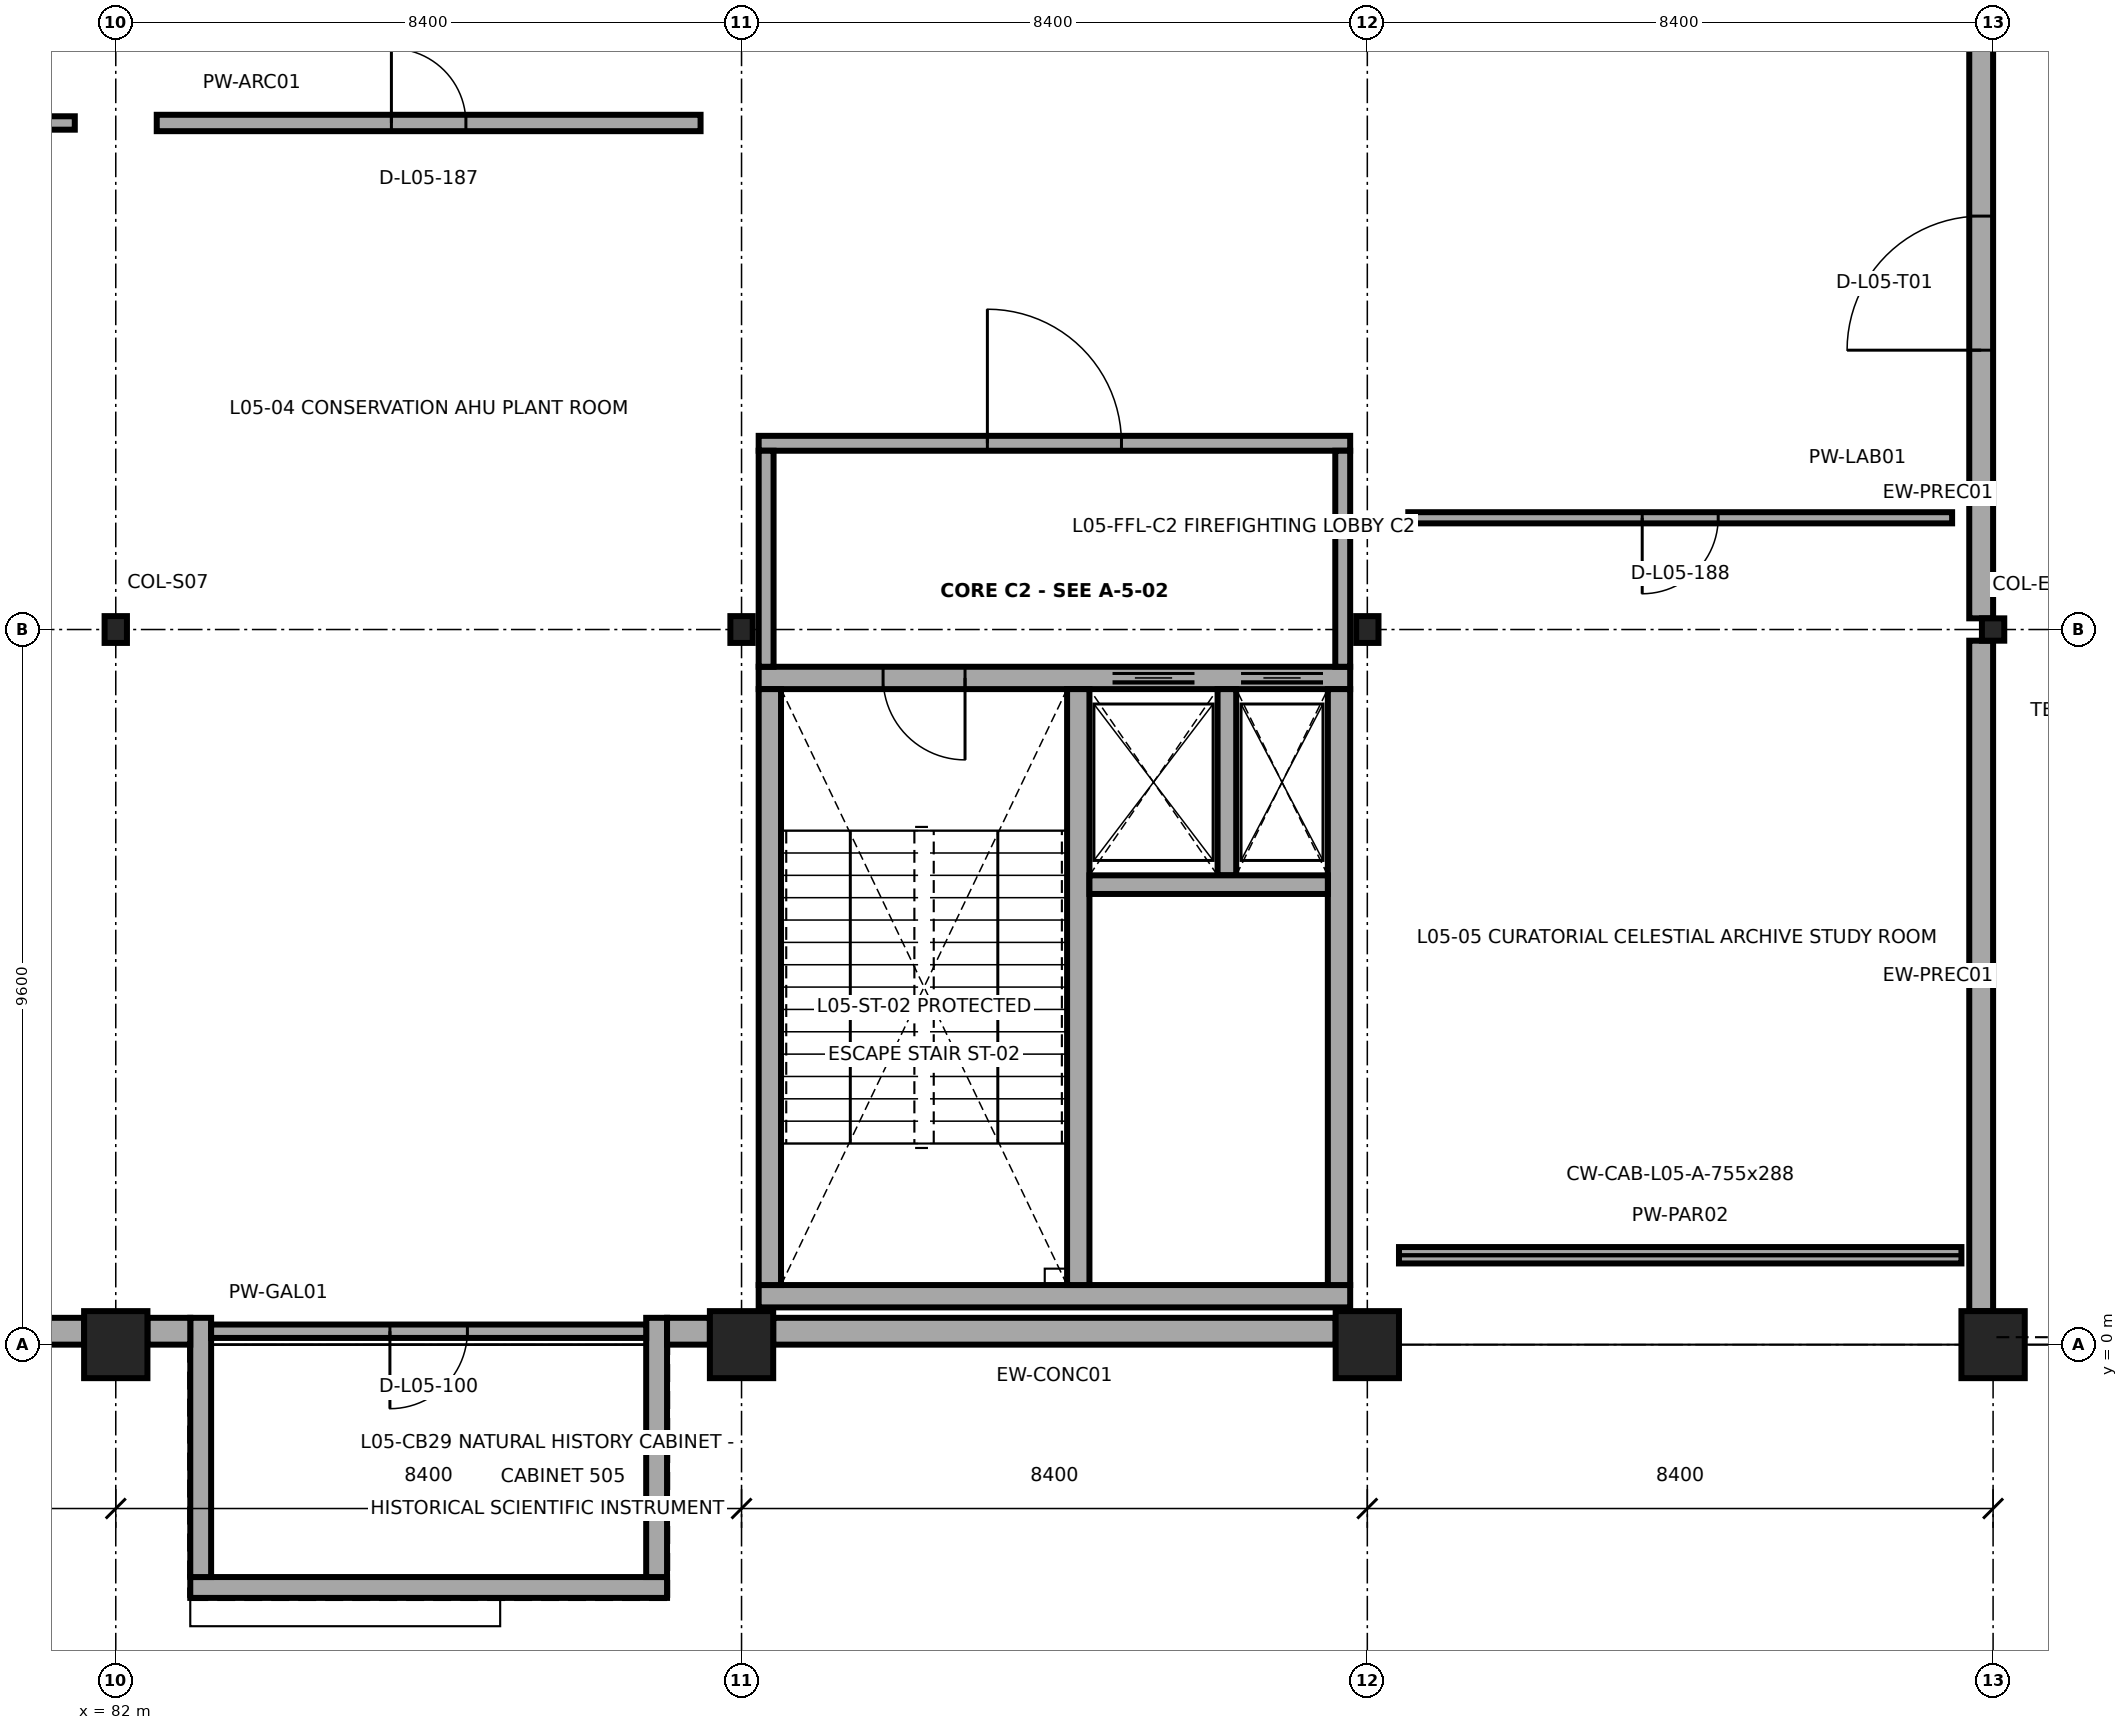
"""IFC4 building model, lengths in metres.
Left out: names, types, materials, properties, quantities, classifications, styles, units other than length and angle.
Written with IfcOpenShell. Run it as: python <this file> out.ifc"""

import sys

from ifc_helpers import new_model, si_unit, direction, frame, frame_2d, origin, origin_2d, place, context, subcontext, project, spatial, rectangle, i_section, extrude, element, fill, save


model = new_model("IFC4")
c1 = context("Model", 3, precision=1e-05, world=origin(), true_north=direction((0.0, 1.0)))
c2 = subcontext(c1, "Body", "Model", "MODEL_VIEW")
j1 = project(units=[si_unit("LENGTHUNIT", "METRE"), si_unit("PLANEANGLEUNIT", "RADIAN")], contexts=[c1])
p1 = place(None, origin())
s1 = spatial("IfcSite", under=j1, at=p1, CompositionType="ELEMENT")
p2 = place(p1, origin())
s2 = spatial("IfcBuilding", under=s1, at=p2, CompositionType="ELEMENT")
p3 = place(p2, frame((0.0, 0.0, 26.4)))
s3 = spatial("IfcBuildingStorey", under=s2, at=p3, CompositionType="ELEMENT", Elevation=26.4)
p4 = place(p3, frame((82.0, 0.0, 0.0), z_axis=(0.0, 0.0, 1.0), x_axis=(1.0, 0.0, 0.0)))
e1 = element("IfcColumn", 1, at=p4, inside=s3, PredefinedType="COLUMN", context=c2, shape_type="SweptSolid", body=[
    extrude(rectangle(XDim=0.85, YDim=0.9, at=origin_2d()), origin(), (0.0, 0.0, 1.0), 4.8),
])
p5 = place(p3, frame((82.0, 9.6, 0.0), z_axis=(0.0, 0.0, 1.0), x_axis=(1.0, 0.0, 0.0)))
e2 = element("IfcColumn", 2, at=p5, inside=s3, PredefinedType="COLUMN", context=c2, shape_type="SweptSolid", body=[
    extrude(i_section(OverallWidth=0.3, OverallDepth=0.36, WebThickness=0.012, FlangeThickness=0.022, FilletRadius=0.027, at=origin_2d()), origin(), (0.0, 0.0, 1.0), 4.8),
])
p6 = place(p3, frame((90.4, 0.0, 0.0), z_axis=(0.0, 0.0, 1.0), x_axis=(1.0, 0.0, 0.0)))
e3 = element("IfcColumn", 3, at=p6, inside=s3, PredefinedType="COLUMN", context=c2, shape_type="SweptSolid", body=[
    extrude(rectangle(XDim=0.85, YDim=0.9, at=origin_2d()), origin(), (0.0, 0.0, 1.0), 4.8),
])
p7 = place(p3, frame((90.4, 9.6, 0.0), z_axis=(0.0, 0.0, 1.0), x_axis=(1.0, 0.0, 0.0)))
e4 = element("IfcColumn", 4, at=p7, inside=s3, PredefinedType="COLUMN", context=c2, shape_type="SweptSolid", body=[
    extrude(i_section(OverallWidth=0.3, OverallDepth=0.36, WebThickness=0.012, FlangeThickness=0.022, FilletRadius=0.027, at=origin_2d()), origin(), (0.0, 0.0, 1.0), 4.8),
])
p8 = place(p3, frame((98.8, 0.0, 0.0), z_axis=(0.0, 0.0, 1.0), x_axis=(1.0, 0.0, 0.0)))
e5 = element("IfcColumn", 5, at=p8, inside=s3, PredefinedType="COLUMN", context=c2, shape_type="SweptSolid", body=[
    extrude(rectangle(XDim=0.85, YDim=0.9, at=origin_2d()), origin(), (0.0, 0.0, 1.0), 4.8),
])
p9 = place(p3, frame((98.8, 9.6, 0.0), z_axis=(0.0, 0.0, 1.0), x_axis=(1.0, 0.0, 0.0)))
e6 = element("IfcColumn", 6, at=p9, inside=s3, PredefinedType="COLUMN", context=c2, shape_type="SweptSolid", body=[
    extrude(i_section(OverallWidth=0.3, OverallDepth=0.36, WebThickness=0.012, FlangeThickness=0.022, FilletRadius=0.027, at=origin_2d()), origin(), (0.0, 0.0, 1.0), 4.8),
])
p10 = place(p3, frame((107.2, 0.0, 0.0), z_axis=(0.0, 0.0, 1.0), x_axis=(1.0, 0.0, 0.0)))
e7 = element("IfcColumn", 7, at=p10, inside=s3, PredefinedType="COLUMN", context=c2, shape_type="SweptSolid", body=[
    extrude(rectangle(XDim=0.85, YDim=0.9, at=origin_2d()), origin(), (0.0, 0.0, 1.0), 4.8),
])
p11 = place(p3, frame((107.2, 9.6, 0.0), z_axis=(0.0, 0.0, 1.0), x_axis=(0.0, 1.0, 0.0)))
e8 = element("IfcColumn", 8, at=p11, inside=s3, PredefinedType="COLUMN", context=c2, shape_type="SweptSolid", body=[
    extrude(i_section(OverallWidth=0.3, OverallDepth=0.3, WebThickness=0.011, FlangeThickness=0.019, FilletRadius=0.027, at=origin_2d()), origin(), (0.0, 0.0, 1.0), 4.8),
])
p12 = place(p3, frame((83.0, -3.26, 0.0), z_axis=(0.0, 0.0, 1.0), x_axis=(1.0, 0.0, 0.0)))
e9 = element("IfcWall", 9, at=p12, inside=s3, PredefinedType="SOLIDWALL", context=c2, shape_type="SweptSolid", body=[
    extrude(rectangle(XDim=6.4, YDim=0.28, at=frame_2d((3.2, 0.0))), origin(), (0.0, 0.0, 1.0), 2.99),
])
for number, where, z_axis, x_axis in (
    (10, (83.14, 0.36, 0.0), (0.0, 0.0, 1.0), (0.0, -1.0, 0.0)),
    (11, (89.26, -3.12, 0.0), (0.0, 0.0, 1.0), (0.0, 1.0, 0.0)),
):
    element("IfcWall", number, at=place(p3, frame(where, z_axis=z_axis, x_axis=x_axis)), inside=s3, PredefinedType="SOLIDWALL", context=c2, shape_type="SweptSolid", body=[
        extrude(rectangle(XDim=3.48, YDim=0.28, at=frame_2d((1.74, 0.0))), origin(), (0.0, 0.0, 1.0), 2.99),
    ])
for number, where, z_axis, x_axis in (
    (12, (81.0, 0.18, 0.0), (0.0, 0.0, 1.0), (1.0, 0.0, 0.0)),
    (13, (82.425, 0.18, 0.0), (0.0, 0.0, 1.0), (1.0, 0.0, 0.0)),
):
    element("IfcWall", number, at=place(p3, frame(where, z_axis=z_axis, x_axis=x_axis)), inside=s3, PredefinedType="SOLIDWALL", context=c2, shape_type="SweptSolid", body=[
        extrude(rectangle(XDim=0.575, YDim=0.36, at=frame_2d((0.288, 0.0))), origin(), (0.0, 0.0, 1.0), 3.625),
    ])
p13 = place(p3, frame((89.4, 0.18, 0.0), z_axis=(0.0, 0.0, 1.0), x_axis=(1.0, 0.0, 0.0)))
e14 = element("IfcWall", 14, at=p13, inside=s3, PredefinedType="SOLIDWALL", context=c2, shape_type="SweptSolid", body=[
    extrude(rectangle(XDim=0.575, YDim=0.36, at=frame_2d((0.288, 0.0))), origin(), (0.0, 0.0, 1.0), 3.625),
])
p14 = place(p3, frame((90.825, 0.18, 0.0), z_axis=(0.0, 0.0, 1.0), x_axis=(1.0, 0.0, 0.0)))
e15 = element("IfcWall", 15, at=p14, inside=s3, PredefinedType="SOLIDWALL", context=c2, shape_type="SweptSolid", body=[
    extrude(rectangle(XDim=7.55, YDim=0.36, at=frame_2d((3.775, 0.0))), origin(), (0.0, 0.0, 1.0), 3.625),
])
p15 = place(p3, frame((99.225, 1.2, -0.002), z_axis=(0.0, 0.0, 1.0), x_axis=(1.0, 0.0, 0.0)))
e16 = element("IfcWall", 16, at=p15, inside=s3, PredefinedType="PARAPET", context=c2, shape_type="SweptSolid", body=[
    extrude(rectangle(XDim=7.55, YDim=0.22, at=frame_2d((3.775, 0.0))), origin(), (0.0, 0.0, 1.0), 0.746),
])
p16 = place(p3, frame((107.04, 9.75, 0.0), z_axis=(0.0, 0.0, 1.0), x_axis=(0.0, 1.0, 0.0)))
e17 = element("IfcWall", 17, at=p16, inside=s3, PredefinedType="SOLIDWALL", context=c2, shape_type="SweptSolid", body=[
    extrude(rectangle(XDim=9.0, YDim=0.32, at=frame_2d((4.5, 0.0))), origin(), (0.0, 0.0, 1.0), 3.622),
])
p17 = place(p16, frame((3.6, 0.0, 0.0)))
e18 = element("IfcOpeningElement", 18, at=p17, cuts=e17, PredefinedType="OPENING", context=c2, shape_type="SweptSolid", body=[
    extrude(rectangle(XDim=1.8, YDim=2.3, at=frame_2d((0.9, 1.15))), frame((0.0, 0.17, 0.0), z_axis=(0.0, -1.0, 0.0), x_axis=(1.0, 0.0, 0.0)), (0.0, 0.0, 1.0), 0.34),
])
p18 = place(p3, frame((107.04, 0.45, 0.0), z_axis=(0.0, 0.0, 1.0), x_axis=(0.0, 1.0, 0.0)))
e19 = element("IfcWall", 19, at=p18, inside=s3, PredefinedType="SOLIDWALL", context=c2, shape_type="SweptSolid", body=[
    extrude(rectangle(XDim=9.0, YDim=0.32, at=frame_2d((4.5, 0.0))), origin(), (0.0, 0.0, 1.0), 3.622),
])
p19 = place(p3, frame((90.63, 0.65, 0.0), z_axis=(0.0, 0.0, 1.0), x_axis=(1.0, 0.0, 0.0)))
e20 = element("IfcWall", 20, at=p19, inside=s3, PredefinedType="SHEAR", context=c2, shape_type="SweptSolid", body=[
    extrude(rectangle(XDim=7.94, YDim=0.3, at=frame_2d((3.97, 0.0))), origin(), (0.0, 0.0, 1.0), 4.54),
])
p20 = place(p3, frame((98.57, 8.95, 0.0), z_axis=(0.0, 0.0, 1.0), x_axis=(-1.0, 0.0, 0.0)))
e21 = element("IfcWall", 21, at=p20, inside=s3, PredefinedType="SHEAR", context=c2, shape_type="SweptSolid", body=[
    extrude(rectangle(XDim=7.94, YDim=0.3, at=frame_2d((3.97, 0.0))), origin(), (0.0, 0.0, 1.0), 4.54),
])
p21 = place(p20, frame((5.17, 0.0, 0.0)))
e22 = element("IfcOpeningElement", 22, at=p21, cuts=e21, PredefinedType="OPENING", context=c2, shape_type="SweptSolid", body=[
    extrude(rectangle(XDim=1.1, YDim=2.2, at=frame_2d((0.55, 1.1))), frame((0.0, 0.16, 0.0), z_axis=(0.0, -1.0, 0.0), x_axis=(1.0, 0.0, 0.0)), (0.0, 0.0, 1.0), 0.32),
])
p22 = place(p20, frame((2.09, 0.0, 0.0)))
e23 = element("IfcOpeningElement", 23, at=p22, cuts=e21, PredefinedType="OPENING", context=c2, shape_type="SweptSolid", body=[
    extrude(rectangle(XDim=1.1, YDim=2.1, at=frame_2d((0.55, 1.05))), frame((0.0, 0.16, 0.0), z_axis=(0.0, -1.0, 0.0), x_axis=(1.0, 0.0, 0.0)), (0.0, 0.0, 1.0), 0.32),
])
p23 = place(p20, frame((0.365, 0.0, 0.0)))
e24 = element("IfcOpeningElement", 24, at=p23, cuts=e21, PredefinedType="OPENING", context=c2, shape_type="SweptSolid", body=[
    extrude(rectangle(XDim=1.1, YDim=2.1, at=frame_2d((0.55, 1.05))), frame((0.0, 0.16, 0.0), z_axis=(0.0, -1.0, 0.0), x_axis=(1.0, 0.0, 0.0)), (0.0, 0.0, 1.0), 0.32),
])
for number, where, z_axis, x_axis in (
    (25, (90.78, 8.8, 0.0), (0.0, 0.0, 1.0), (0.0, -1.0, 0.0)),
    (26, (98.42, 0.8, 0.0), (0.0, 0.0, 1.0), (0.0, 1.0, 0.0)),
    (27, (94.92, 0.8, 0.0), (0.0, 0.0, 1.0), (0.0, 1.0, 0.0)),
):
    element("IfcWall", number, at=place(p3, frame(where, z_axis=z_axis, x_axis=x_axis)), inside=s3, PredefinedType="SHEAR", context=c2, shape_type="SweptSolid", body=[
        extrude(rectangle(XDim=8.0, YDim=0.3, at=frame_2d((4.0, 0.0))), origin(), (0.0, 0.0, 1.0), 4.54),
    ])
p24 = place(p3, frame((96.915, 6.3, 0.0), z_axis=(0.0, 0.0, 1.0), x_axis=(0.0, 1.0, 0.0)))
e28 = element("IfcWall", 28, at=p24, inside=s3, PredefinedType="SHEAR", context=c2, shape_type="SweptSolid", body=[
    extrude(rectangle(XDim=2.5, YDim=0.25, at=frame_2d((1.25, 0.0))), origin(), (0.0, 0.0, 1.0), 4.54),
])
p25 = place(p3, frame((95.07, 6.175, 0.0), z_axis=(0.0, 0.0, 1.0), x_axis=(1.0, 0.0, 0.0)))
e29 = element("IfcWall", 29, at=p25, inside=s3, PredefinedType="SHEAR", context=c2, shape_type="SweptSolid", body=[
    extrude(rectangle(XDim=3.2, YDim=0.25, at=frame_2d((1.6, 0.0))), origin(), (0.0, 0.0, 1.0), 4.54),
])
p26 = place(p3, frame((90.63, 12.1, 0.0), z_axis=(0.0, 0.0, 1.0), x_axis=(1.0, 0.0, 0.0)))
e30 = element("IfcWall", 30, at=p26, inside=s3, PredefinedType="SOLIDWALL", context=c2, shape_type="SweptSolid", body=[
    extrude(rectangle(XDim=7.94, YDim=0.2, at=frame_2d((3.97, 0.0))), origin(), (0.0, 0.0, 1.0), 4.192),
])
p27 = place(p26, frame((3.07, 0.0, 0.0)))
e31 = element("IfcOpeningElement", 31, at=p27, cuts=e30, PredefinedType="OPENING", context=c2, shape_type="SweptSolid", body=[
    extrude(rectangle(XDim=1.8, YDim=2.2, at=frame_2d((0.9, 1.1))), frame((0.0, 0.11, 0.0), z_axis=(0.0, -1.0, 0.0), x_axis=(1.0, 0.0, 0.0)), (0.0, 0.0, 1.0), 0.22),
])
for number, where, z_axis, x_axis in (
    (32, (90.73, 9.1, 0.0), (0.0, 0.0, 1.0), (0.0, 1.0, 0.0)),
    (33, (98.47, 12.0, 0.0), (0.0, 0.0, 1.0), (0.0, -1.0, 0.0)),
):
    element("IfcWall", number, at=place(p3, frame(where, z_axis=z_axis, x_axis=x_axis)), inside=s3, PredefinedType="SOLIDWALL", context=c2, shape_type="SweptSolid", body=[
        extrude(rectangle(XDim=2.9, YDim=0.2, at=frame_2d((1.45, 0.0))), origin(), (0.0, 0.0, 1.0), 4.022),
    ])
p28 = place(p3, frame((83.28, 0.18, 0.0), z_axis=(0.0, 0.0, 1.0), x_axis=(1.0, 0.0, 0.0)))
e34 = element("IfcWall", 34, at=p28, inside=s3, PredefinedType="PARTITIONING", context=c2, shape_type="SweptSolid", body=[
    extrude(rectangle(XDim=5.84, YDim=0.18, at=frame_2d((2.92, 0.0))), origin(), (0.0, 0.0, 1.0), 2.99),
])
p29 = place(p28, frame((2.4, 0.0, 0.0)))
e35 = element("IfcOpeningElement", 35, at=p29, cuts=e34, PredefinedType="OPENING", context=c2, shape_type="SweptSolid", body=[
    extrude(rectangle(XDim=1.04, YDim=2.18, at=frame_2d((0.52, 1.09))), frame((0.0, 0.1, 0.0), z_axis=(0.0, -1.0, 0.0), x_axis=(1.0, 0.0, 0.0)), (0.0, 0.0, 1.0), 0.2),
])
p30 = place(p3, frame((65.75, 16.4, 0.0), z_axis=(0.0, 0.0, 1.0), x_axis=(1.0, 0.0, 0.0)))
e36 = element("IfcWall", 36, at=p30, inside=s3, PredefinedType="PARTITIONING", context=c2, shape_type="SweptSolid", body=[
    extrude(rectangle(XDim=15.7, YDim=0.18, at=frame_2d((7.85, 0.0))), origin(), (0.0, 0.0, 1.0), 4.192),
])
p31 = place(p30, frame((7.0, 0.0, 0.0)))
e37 = element("IfcOpeningElement", 37, at=p31, cuts=e36, PredefinedType="OPENING", context=c2, shape_type="SweptSolid", body=[
    extrude(rectangle(XDim=1.7, YDim=2.35, at=frame_2d((0.85, 1.175))), frame((0.0, 0.1, 0.0), z_axis=(0.0, -1.0, 0.0), x_axis=(1.0, 0.0, 0.0)), (0.0, 0.0, 1.0), 0.2),
])
p32 = place(p3, frame((82.55, 16.4, 0.0), z_axis=(0.0, 0.0, 1.0), x_axis=(1.0, 0.0, 0.0)))
e38 = element("IfcWall", 38, at=p32, inside=s3, PredefinedType="PARTITIONING", context=c2, shape_type="SweptSolid", body=[
    extrude(rectangle(XDim=7.3, YDim=0.22, at=frame_2d((3.65, 0.0))), origin(), (0.0, 0.0, 1.0), 4.192),
])
p33 = place(p32, frame((3.15, 0.0, 0.0)))
e39 = element("IfcOpeningElement", 39, at=p33, cuts=e38, PredefinedType="OPENING", context=c2, shape_type="SweptSolid", body=[
    extrude(rectangle(XDim=1.0, YDim=2.15, at=frame_2d((0.5, 1.075))), frame((0.0, 0.12, 0.0), z_axis=(0.0, -1.0, 0.0), x_axis=(1.0, 0.0, 0.0)), (0.0, 0.0, 1.0), 0.24),
])
p34 = place(p3, frame((99.35, 11.1, 0.0), z_axis=(0.0, 0.0, 1.0), x_axis=(1.0, 0.0, 0.0)))
e40 = element("IfcWall", 40, at=p34, inside=s3, PredefinedType="PARTITIONING", context=c2, shape_type="SweptSolid", body=[
    extrude(rectangle(XDim=7.3, YDim=0.15, at=frame_2d((3.65, 0.0))), origin(), (0.0, 0.0, 1.0), 4.192),
])
p35 = place(p34, frame((3.14, 0.0, 0.0)))
e41 = element("IfcOpeningElement", 41, at=p35, cuts=e40, PredefinedType="OPENING", context=c2, shape_type="SweptSolid", body=[
    extrude(rectangle(XDim=1.02, YDim=2.18, at=frame_2d((0.51, 1.09))), frame((0.0, 0.085, 0.0), z_axis=(0.0, -1.0, 0.0), x_axis=(1.0, 0.0, 0.0)), (0.0, 0.0, 1.0), 0.17),
])
p36 = place(p17, frame((1.8, 0.0, 0.0), z_axis=(0.0, 0.0, 1.0), x_axis=(-1.0, 0.0, 0.0)))
e42 = element("IfcDoor", 42, at=p36, inside=s3, OperationType="DOUBLE_DOOR_SINGLE_SWING", PredefinedType="DOOR", context=c2, shape_type="SweptSolid", body=[
    extrude(rectangle(XDim=1.8, YDim=2.3, at=frame_2d((0.9, 1.15))), frame((0.0, 0.025, 0.0), z_axis=(0.0, -1.0, 0.0), x_axis=(1.0, 0.0, 0.0)), (0.0, 0.0, 1.0), 0.05),
])
fill(e18, e42)
p37 = place(p21, origin())
e43 = element("IfcDoor", 43, at=p37, inside=s3, OperationType="SINGLE_SWING_LEFT", PredefinedType="DOOR", context=c2, shape_type="SweptSolid", body=[
    extrude(rectangle(XDim=1.1, YDim=2.2, at=frame_2d((0.55, 1.1))), frame((0.0, 0.025, 0.0), z_axis=(0.0, -1.0, 0.0), x_axis=(1.0, 0.0, 0.0)), (0.0, 0.0, 1.0), 0.05),
])
fill(e22, e43)
p38 = place(p22, origin())
e44 = element("IfcDoor", 44, at=p38, inside=s3, OperationType="SLIDING_TO_LEFT", PredefinedType="DOOR", context=c2, shape_type="SweptSolid", body=[
    extrude(rectangle(XDim=1.1, YDim=2.1, at=frame_2d((0.55, 1.05))), frame((0.0, 0.025, 0.0), z_axis=(0.0, -1.0, 0.0), x_axis=(1.0, 0.0, 0.0)), (0.0, 0.0, 1.0), 0.05),
])
fill(e23, e44)
p39 = place(p23, origin())
e45 = element("IfcDoor", 45, at=p39, inside=s3, OperationType="SLIDING_TO_LEFT", PredefinedType="DOOR", context=c2, shape_type="SweptSolid", body=[
    extrude(rectangle(XDim=1.1, YDim=2.1, at=frame_2d((0.55, 1.05))), frame((0.0, 0.025, 0.0), z_axis=(0.0, -1.0, 0.0), x_axis=(1.0, 0.0, 0.0)), (0.0, 0.0, 1.0), 0.05),
])
fill(e24, e45)
p40 = place(p27, origin())
e46 = element("IfcDoor", 46, at=p40, inside=s3, OperationType="DOUBLE_DOOR_SINGLE_SWING", PredefinedType="DOOR", context=c2, shape_type="SweptSolid", body=[
    extrude(rectangle(XDim=1.8, YDim=2.2, at=frame_2d((0.9, 1.1))), frame((0.0, 0.025, 0.0), z_axis=(0.0, -1.0, 0.0), x_axis=(1.0, 0.0, 0.0)), (0.0, 0.0, 1.0), 0.05),
])
fill(e31, e46)
p41 = place(p29, origin())
e47 = element("IfcDoor", 47, at=p41, inside=s3, OperationType="SINGLE_SWING_RIGHT", PredefinedType="DOOR", context=c2, shape_type="SweptSolid", body=[
    extrude(rectangle(XDim=1.04, YDim=2.18, at=frame_2d((0.52, 1.09))), frame((0.0, 0.025, 0.0), z_axis=(0.0, -1.0, 0.0), x_axis=(1.0, 0.0, 0.0)), (0.0, 0.0, 1.0), 0.05),
])
fill(e35, e47)
p42 = place(p33, origin())
e48 = element("IfcDoor", 48, at=p42, inside=s3, OperationType="SINGLE_SWING_LEFT", PredefinedType="DOOR", context=c2, shape_type="SweptSolid", body=[
    extrude(rectangle(XDim=1.0, YDim=2.15, at=frame_2d((0.5, 1.075))), frame((0.0, 0.025, 0.0), z_axis=(0.0, -1.0, 0.0), x_axis=(1.0, 0.0, 0.0)), (0.0, 0.0, 1.0), 0.05),
])
fill(e39, e48)
p43 = place(p35, origin())
e49 = element("IfcDoor", 49, at=p43, inside=s3, OperationType="SINGLE_SWING_RIGHT", PredefinedType="DOOR", context=c2, shape_type="SweptSolid", body=[
    extrude(rectangle(XDim=1.02, YDim=2.18, at=frame_2d((0.51, 1.09))), frame((0.0, 0.025, 0.0), z_axis=(0.0, -1.0, 0.0), x_axis=(1.0, 0.0, 0.0)), (0.0, 0.0, 1.0), 0.05),
])
fill(e41, e49)
save(model, sys.argv[1])
